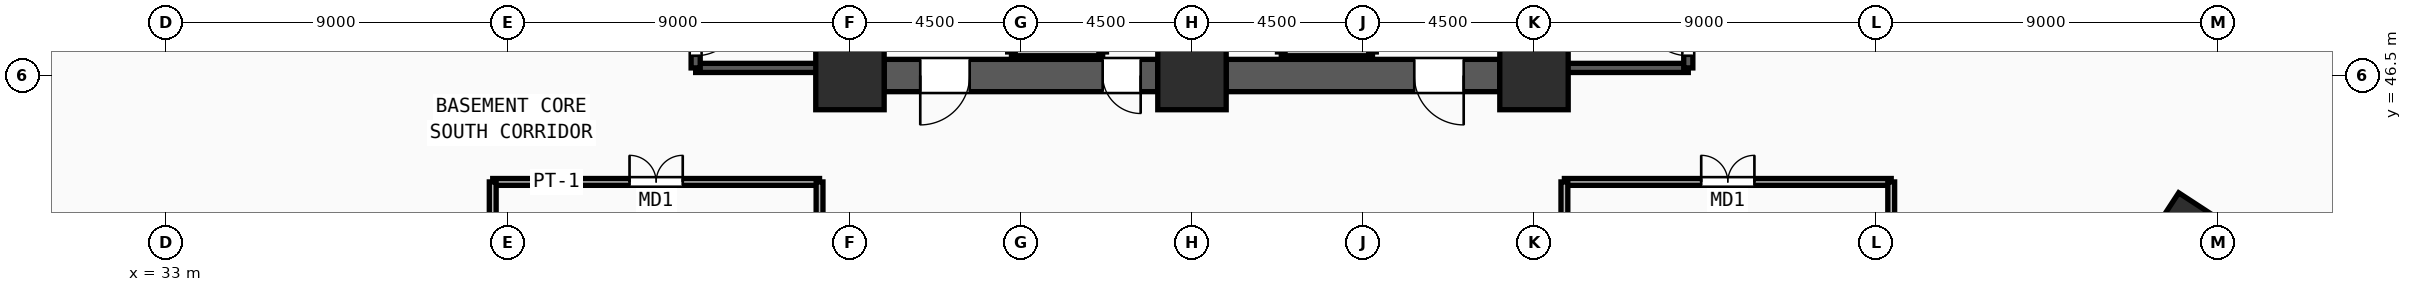
"""IFC4 building model, lengths in metres.
Left out: names, types, materials, properties, quantities, classifications, styles, units other than length and angle.
Written with IfcOpenShell. Run it as: python <this file> out.ifc"""

import sys

from ifc_helpers import new_model, si_unit, direction, frame, frame_2d, origin, origin_2d, place, context, subcontext, project, spatial, rectangle, extrude, source, transform, mapped, element, fill, save


model = new_model("IFC4")
c1 = context("Model", 3, precision=1e-05, world=origin(), true_north=direction((0.0, 1.0)))
c2 = subcontext(c1, "Body", "Model", "MODEL_VIEW")
j1 = project(units=[si_unit("LENGTHUNIT", "METRE"), si_unit("PLANEANGLEUNIT", "RADIAN")], contexts=[c1])
p1 = place(None, origin())
s1 = spatial("IfcSite", under=j1, at=p1, CompositionType="ELEMENT")
p2 = place(p1, origin())
s2 = spatial("IfcBuilding", under=s1, at=p2, CompositionType="ELEMENT")
p3 = place(p2, frame((0.0, 0.0, -4.8)))
s3 = spatial("IfcBuildingStorey", under=s2, at=p3, CompositionType="ELEMENT", Elevation=-4.8)
m1 = source(origin(), c2, "Body", "SweptSolid", [
    extrude(rectangle(XDim=1.8, YDim=1.8, at=origin_2d()), origin(), (0.0, 0.0, 1.0), 4.8),
])
for number, where, z_axis, x_axis in (
    (1, (51.0, 46.5, 0.0), (0.0, 0.0, 1.0), (1.0, 0.0, 0.0)),
    (2, (60.0, 46.5, 0.0), (0.0, 0.0, 1.0), (1.0, 0.0, 0.0)),
    (3, (69.0, 46.5, 0.0), (0.0, 0.0, 1.0), (1.0, 0.0, 0.0)),
):
    element("IfcColumn", number, at=place(p3, frame(where, z_axis=z_axis, x_axis=x_axis)), inside=s3, PredefinedType="COLUMN", context=c2, shape_type="MappedRepresentation", body=[
        mapped(m1, transform((0.0, 0.0, 0.0), x_axis=(1.0, 0.0, 0.0), y_axis=(0.0, 1.0, 0.0), z_axis=(0.0, 0.0, 1.0), scale=1.0)),
    ])
m2 = source(origin(), c2, "Body", "SweptSolid", [
    extrude(rectangle(XDim=1.55, YDim=1.25, at=origin_2d()), origin(), (0.0, 0.0, 1.0), 4.8),
])
p4 = place(p3, frame((86.064, 42.423, 0.0), z_axis=(0.0, 0.0, 1.0), x_axis=(0.546978918409, 0.837146380758, 0.0)))
e4 = element("IfcColumn", 4, at=p4, inside=s3, PredefinedType="COLUMN", context=c2, shape_type="MappedRepresentation", body=[
    mapped(m2, transform((0.0, 0.0, 0.0), x_axis=(1.0, 0.0, 0.0), y_axis=(0.0, 1.0, 0.0), z_axis=(0.0, 0.0, 1.0), scale=1.0)),
])
p5 = place(p3, frame((68.1, 46.5, 0.0), z_axis=(0.0, 0.0, 1.0), x_axis=(-1.0, 0.0, 0.0)))
e5 = element("IfcWall", 5, at=p5, inside=s3, PredefinedType="SHEAR", context=c2, shape_type="SweptSolid", body=[
    extrude(rectangle(XDim=7.2, YDim=0.85, at=frame_2d((3.6, 0.0))), origin(), (0.0, 0.0, 1.0), 4.55),
])
m3 = source(origin(), c2, "Body", "SweptSolid", [
    extrude(rectangle(XDim=1.3, YDim=2.2, at=frame_2d((0.65, 1.1))), frame((0.0, 0.435, 0.0), z_axis=(0.0, -1.0, 0.0), x_axis=(1.0, 0.0, 0.0)), (0.0, 0.0, 1.0), 0.87),
])
p6 = place(p5, frame((0.95, 0.0, 0.0)))
e6 = element("IfcOpeningElement", 6, at=p6, cuts=e5, PredefinedType="OPENING", context=c2, shape_type="MappedRepresentation", body=[
    mapped(m3, transform((0.0, 0.0, 0.0), x_axis=(1.0, 0.0, 0.0), y_axis=(0.0, 1.0, 0.0), z_axis=(0.0, 0.0, 1.0), scale=1.0)),
])
p7 = place(p3, frame((59.1, 46.5, 0.0), z_axis=(0.0, 0.0, 1.0), x_axis=(-1.0, 0.0, 0.0)))
e7 = element("IfcWall", 7, at=p7, inside=s3, PredefinedType="SHEAR", context=c2, shape_type="SweptSolid", body=[
    extrude(rectangle(XDim=7.2, YDim=0.85, at=frame_2d((3.6, 0.0))), origin(), (0.0, 0.0, 1.0), 4.55),
])
p8 = place(p7, frame((4.95, 0.0, 0.0)))
e8 = element("IfcOpeningElement", 8, at=p8, cuts=e7, PredefinedType="OPENING", context=c2, shape_type="MappedRepresentation", body=[
    mapped(m3, transform((0.0, 0.0, 0.0), x_axis=(1.0, 0.0, 0.0), y_axis=(0.0, 1.0, 0.0), z_axis=(0.0, 0.0, 1.0), scale=1.0)),
])
m4 = source(origin(), c2, "Body", "SweptSolid", [
    extrude(rectangle(XDim=1.0, YDim=2.2, at=frame_2d((0.5, 1.1))), frame((0.0, 0.435, 0.0), z_axis=(0.0, -1.0, 0.0), x_axis=(1.0, 0.0, 0.0)), (0.0, 0.0, 1.0), 0.87),
])
p9 = place(p7, frame((0.45, 0.0, 0.0)))
e9 = element("IfcOpeningElement", 9, at=p9, cuts=e7, PredefinedType="OPENING", context=c2, shape_type="MappedRepresentation", body=[
    mapped(m4, transform((0.0, 0.0, 0.0), x_axis=(1.0, 0.0, 0.0), y_axis=(0.0, 1.0, 0.0), z_axis=(0.0, 0.0, 1.0), scale=1.0)),
])
p10 = place(p3, frame((46.94, 46.7, 0.0), z_axis=(0.0, 0.0, 1.0), x_axis=(1.0, 0.0, 0.0)))
e10 = element("IfcWall", 10, at=p10, inside=s3, PredefinedType="SOLIDWALL", context=c2, shape_type="SweptSolid", body=[
    extrude(rectangle(XDim=3.44, YDim=0.24, at=frame_2d((1.72, 0.0))), origin(), (0.0, 0.0, 1.0), 4.55),
])
p11 = place(p3, frame((50.38, 46.7, 0.0), z_axis=(0.0, 0.0, 1.0), x_axis=(0.0, 1.0, 0.0)))
e11 = element("IfcWall", 11, at=p11, inside=s3, PredefinedType="SOLIDWALL", context=c2, shape_type="SweptSolid", body=[
    extrude(rectangle(XDim=7.82, YDim=0.24, at=frame_2d((3.91, 0.0))), origin(), (0.0, 0.0, 1.0), 4.55),
])
p12 = place(p3, frame((46.94, 54.52, 0.0), z_axis=(0.0, 0.0, 1.0), x_axis=(0.0, -1.0, 0.0)))
e12 = element("IfcWall", 12, at=p12, inside=s3, PredefinedType="SOLIDWALL", context=c2, shape_type="SweptSolid", body=[
    extrude(rectangle(XDim=7.82, YDim=0.24, at=frame_2d((3.91, 0.0))), origin(), (0.0, 0.0, 1.0), 4.55),
])
m5 = source(origin(), c2, "Body", "SweptSolid", [
    extrude(rectangle(XDim=1.2, YDim=2.2, at=frame_2d((0.6, 1.1))), frame((0.0, 0.13, 0.0), z_axis=(0.0, -1.0, 0.0), x_axis=(1.0, 0.0, 0.0)), (0.0, 0.0, 1.0), 0.26),
])
p13 = place(p12, frame((6.3, 0.0, 0.0)))
e13 = element("IfcOpeningElement", 13, at=p13, cuts=e12, PredefinedType="OPENING", context=c2, shape_type="MappedRepresentation", body=[
    mapped(m5, transform((0.0, 0.0, 0.0), x_axis=(1.0, 0.0, 0.0), y_axis=(0.0, 1.0, 0.0), z_axis=(0.0, 0.0, 1.0), scale=1.0)),
])
p14 = place(p3, frame((69.62, 46.7, 0.0), z_axis=(0.0, 0.0, 1.0), x_axis=(1.0, 0.0, 0.0)))
e14 = element("IfcWall", 14, at=p14, inside=s3, PredefinedType="SOLIDWALL", context=c2, shape_type="SweptSolid", body=[
    extrude(rectangle(XDim=3.44, YDim=0.24, at=frame_2d((1.72, 0.0))), origin(), (0.0, 0.0, 1.0), 4.55),
])
p15 = place(p3, frame((73.06, 46.7, 0.0), z_axis=(0.0, 0.0, 1.0), x_axis=(0.0, 1.0, 0.0)))
e15 = element("IfcWall", 15, at=p15, inside=s3, PredefinedType="SOLIDWALL", context=c2, shape_type="SweptSolid", body=[
    extrude(rectangle(XDim=7.82, YDim=0.24, at=frame_2d((3.91, 0.0))), origin(), (0.0, 0.0, 1.0), 4.55),
])
p16 = place(p15, frame((0.32, 0.0, 0.0)))
e16 = element("IfcOpeningElement", 16, at=p16, cuts=e15, PredefinedType="OPENING", context=c2, shape_type="MappedRepresentation", body=[
    mapped(m5, transform((0.0, 0.0, 0.0), x_axis=(1.0, 0.0, 0.0), y_axis=(0.0, 1.0, 0.0), z_axis=(0.0, 0.0, 1.0), scale=1.0)),
])
p17 = place(p3, frame((69.62, 54.52, 0.0), z_axis=(0.0, 0.0, 1.0), x_axis=(0.0, -1.0, 0.0)))
e17 = element("IfcWall", 17, at=p17, inside=s3, PredefinedType="SOLIDWALL", context=c2, shape_type="SweptSolid", body=[
    extrude(rectangle(XDim=7.82, YDim=0.24, at=frame_2d((3.91, 0.0))), origin(), (0.0, 0.0, 1.0), 4.55),
])
for number, where, z_axis, x_axis in (
    (18, (55.25, 47.12, 0.0), (0.0, 0.0, 1.0), (1.0, 0.0, 0.0)),
    (19, (62.35, 47.12, 0.0), (0.0, 0.0, 1.0), (1.0, 0.0, 0.0)),
):
    element("IfcWall", number, at=place(p3, frame(where, z_axis=z_axis, x_axis=x_axis)), inside=s3, PredefinedType="SOLIDWALL", context=c2, shape_type="SweptSolid", body=[
        extrude(rectangle(XDim=2.4, YDim=0.2, at=frame_2d((1.2, 0.0))), origin(), (0.0, 0.0, 1.0), 4.55),
    ])
p18 = place(p3, frame((41.6, 43.7, 0.0), z_axis=(0.0, 0.0, 1.0), x_axis=(1.0, 0.0, 0.0)))
e20 = element("IfcWall", 20, at=p18, inside=s3, PredefinedType="PARTITIONING", context=c2, shape_type="SweptSolid", body=[
    extrude(rectangle(XDim=8.6, YDim=0.18, at=frame_2d((4.3, 0.0))), origin(), (0.0, 0.0, 1.0), 4.55),
])
m6 = source(origin(), c2, "Body", "SweptSolid", [
    extrude(rectangle(XDim=1.4, YDim=2.25, at=frame_2d((0.7, 1.125))), frame((0.0, 0.1, 0.0), z_axis=(0.0, -1.0, 0.0), x_axis=(1.0, 0.0, 0.0)), (0.0, 0.0, 1.0), 0.2),
])
p19 = place(p18, frame((3.6, 0.0, 0.0)))
e21 = element("IfcOpeningElement", 21, at=p19, cuts=e20, PredefinedType="OPENING", context=c2, shape_type="MappedRepresentation", body=[
    mapped(m6, transform((0.0, 0.0, 0.0), x_axis=(1.0, 0.0, 0.0), y_axis=(0.0, 1.0, 0.0), z_axis=(0.0, 0.0, 1.0), scale=1.0)),
])
p20 = place(p3, frame((69.8, 43.7, 0.0), z_axis=(0.0, 0.0, 1.0), x_axis=(1.0, 0.0, 0.0)))
e22 = element("IfcWall", 22, at=p20, inside=s3, PredefinedType="PARTITIONING", context=c2, shape_type="SweptSolid", body=[
    extrude(rectangle(XDim=8.6, YDim=0.18, at=frame_2d((4.3, 0.0))), origin(), (0.0, 0.0, 1.0), 4.55),
])
p21 = place(p20, frame((3.6, 0.0, 0.0)))
e23 = element("IfcOpeningElement", 23, at=p21, cuts=e22, PredefinedType="OPENING", context=c2, shape_type="MappedRepresentation", body=[
    mapped(m6, transform((0.0, 0.0, 0.0), x_axis=(1.0, 0.0, 0.0), y_axis=(0.0, 1.0, 0.0), z_axis=(0.0, 0.0, 1.0), scale=1.0)),
])
for number, where, z_axis, x_axis in (
    (24, (41.6, 24.8, 0.0), (0.0, 0.0, 1.0), (0.0, 1.0, 0.0)),
    (25, (50.2, 24.8, 0.0), (0.0, 0.0, 1.0), (0.0, 1.0, 0.0)),
    (26, (69.8, 24.8, 0.0), (0.0, 0.0, 1.0), (0.0, 1.0, 0.0)),
    (27, (78.4, 24.8, 0.0), (0.0, 0.0, 1.0), (0.0, 1.0, 0.0)),
):
    element("IfcWall", number, at=place(p3, frame(where, z_axis=z_axis, x_axis=x_axis)), inside=s3, PredefinedType="PARTITIONING", context=c2, shape_type="SweptSolid", body=[
        extrude(rectangle(XDim=18.9, YDim=0.18, at=frame_2d((9.45, 0.0))), origin(), (0.0, 0.0, 1.0), 4.55),
    ])
m7 = source(origin(), c2, "Body", "SweptSolid", [
    extrude(rectangle(XDim=1.3, YDim=2.2, at=frame_2d((0.65, 1.1))), frame((0.0, 0.025, 0.0), z_axis=(0.0, -1.0, 0.0), x_axis=(1.0, 0.0, 0.0)), (0.0, 0.0, 1.0), 0.05),
])
p22 = place(p8, origin())
e28 = element("IfcDoor", 28, at=p22, inside=s3, OperationType="SINGLE_SWING_RIGHT", PredefinedType="DOOR", context=c2, shape_type="MappedRepresentation", body=[
    mapped(m7, transform((0.0, 0.0, 0.0), x_axis=(1.0, 0.0, 0.0), y_axis=(0.0, 1.0, 0.0), z_axis=(0.0, 0.0, 1.0), scale=1.0)),
])
fill(e8, e28)
m8 = source(origin(), c2, "Body", "SweptSolid", [
    extrude(rectangle(XDim=1.0, YDim=2.2, at=frame_2d((0.5, 1.1))), frame((0.0, 0.025, 0.0), z_axis=(0.0, -1.0, 0.0), x_axis=(1.0, 0.0, 0.0)), (0.0, 0.0, 1.0), 0.05),
])
p23 = place(p9, origin())
e29 = element("IfcDoor", 29, at=p23, inside=s3, OperationType="SINGLE_SWING_LEFT", PredefinedType="DOOR", context=c2, shape_type="MappedRepresentation", body=[
    mapped(m8, transform((0.0, 0.0, 0.0), x_axis=(1.0, 0.0, 0.0), y_axis=(0.0, 1.0, 0.0), z_axis=(0.0, 0.0, 1.0), scale=1.0)),
])
fill(e9, e29)
p24 = place(p6, origin())
e30 = element("IfcDoor", 30, at=p24, inside=s3, OperationType="SINGLE_SWING_LEFT", PredefinedType="DOOR", context=c2, shape_type="MappedRepresentation", body=[
    mapped(m7, transform((0.0, 0.0, 0.0), x_axis=(1.0, 0.0, 0.0), y_axis=(0.0, 1.0, 0.0), z_axis=(0.0, 0.0, 1.0), scale=1.0)),
])
fill(e6, e30)
m9 = source(origin(), c2, "Body", "SweptSolid", [
    extrude(rectangle(XDim=1.2, YDim=2.2, at=frame_2d((0.6, 1.1))), frame((0.0, 0.025, 0.0), z_axis=(0.0, -1.0, 0.0), x_axis=(1.0, 0.0, 0.0)), (0.0, 0.0, 1.0), 0.05),
])
p25 = place(p13, origin())
e31 = element("IfcDoor", 31, at=p25, inside=s3, OperationType="SINGLE_SWING_LEFT", PredefinedType="DOOR", context=c2, shape_type="MappedRepresentation", body=[
    mapped(m9, transform((0.0, 0.0, 0.0), x_axis=(1.0, 0.0, 0.0), y_axis=(0.0, 1.0, 0.0), z_axis=(0.0, 0.0, 1.0), scale=1.0)),
])
fill(e13, e31)
p26 = place(p16, origin())
e32 = element("IfcDoor", 32, at=p26, inside=s3, OperationType="SINGLE_SWING_RIGHT", PredefinedType="DOOR", context=c2, shape_type="MappedRepresentation", body=[
    mapped(m9, transform((0.0, 0.0, 0.0), x_axis=(1.0, 0.0, 0.0), y_axis=(0.0, 1.0, 0.0), z_axis=(0.0, 0.0, 1.0), scale=1.0)),
])
fill(e16, e32)
m10 = source(origin(), c2, "Body", "SweptSolid", [
    extrude(rectangle(XDim=1.4, YDim=2.25, at=frame_2d((0.7, 1.125))), frame((0.0, 0.025, 0.0), z_axis=(0.0, -1.0, 0.0), x_axis=(1.0, 0.0, 0.0)), (0.0, 0.0, 1.0), 0.05),
])
p27 = place(p19, origin())
e33 = element("IfcDoor", 33, at=p27, inside=s3, OperationType="DOUBLE_DOOR_SINGLE_SWING", PredefinedType="DOOR", context=c2, shape_type="MappedRepresentation", body=[
    mapped(m10, transform((0.0, 0.0, 0.0), x_axis=(1.0, 0.0, 0.0), y_axis=(0.0, 1.0, 0.0), z_axis=(0.0, 0.0, 1.0), scale=1.0)),
])
fill(e21, e33)
p28 = place(p21, origin())
e34 = element("IfcDoor", 34, at=p28, inside=s3, OperationType="DOUBLE_DOOR_SINGLE_SWING", PredefinedType="DOOR", context=c2, shape_type="MappedRepresentation", body=[
    mapped(m10, transform((0.0, 0.0, 0.0), x_axis=(1.0, 0.0, 0.0), y_axis=(0.0, 1.0, 0.0), z_axis=(0.0, 0.0, 1.0), scale=1.0)),
])
fill(e23, e34)
save(model, sys.argv[1])
